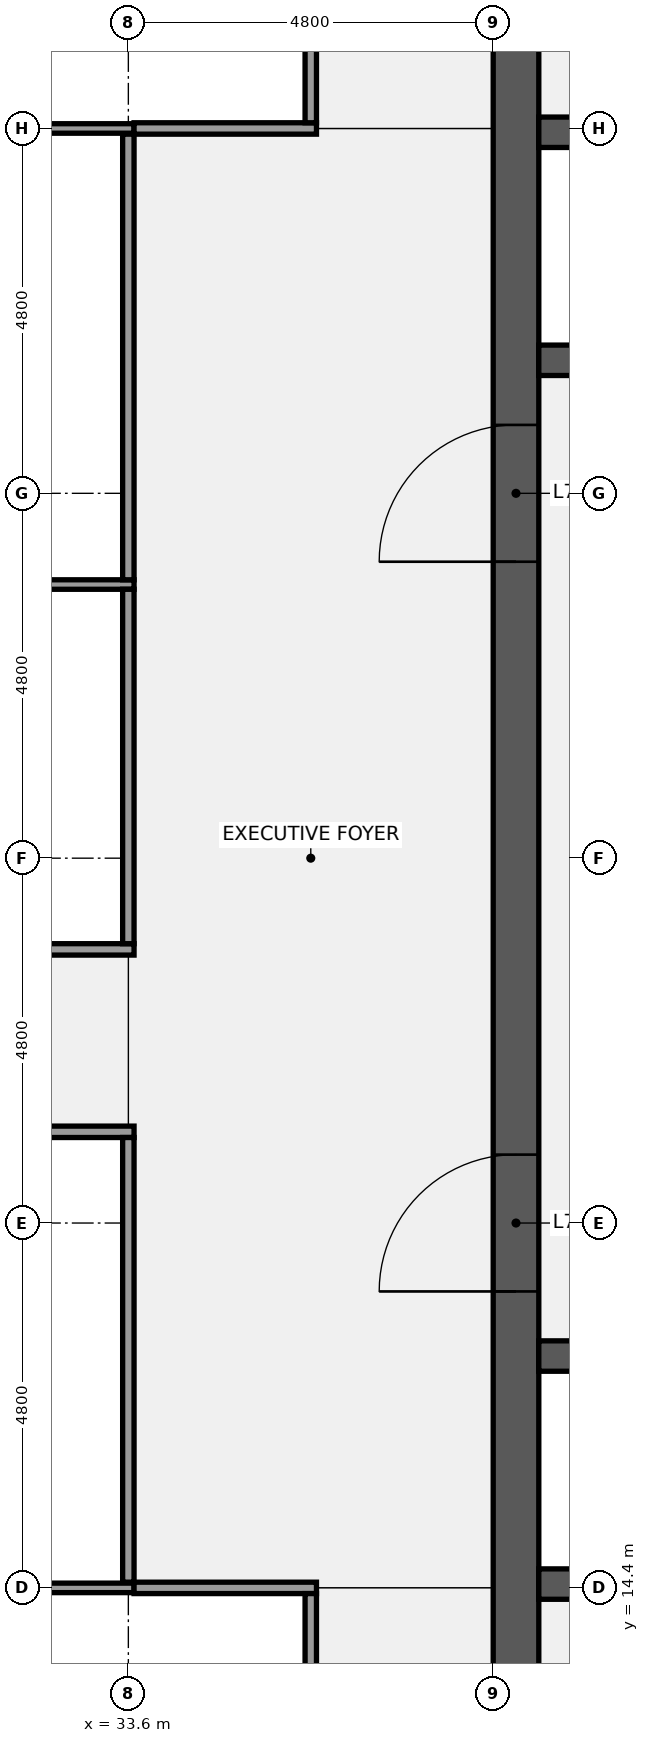
"""IFC4 building model, lengths in metres.
Left out: names, types, materials, properties, quantities, classifications, styles, units other than length and angle.
Written with IfcOpenShell. Run it as: python <this file> out.ifc"""

import sys

from ifc_helpers import new_model, si_unit, direction, frame, frame_2d, origin, place, context, subcontext, project, spatial, rectangle, extrude, element, fill, save


model = new_model("IFC4")
c1 = context("Model", 3, precision=1e-05, world=origin(), true_north=direction((0.0, 1.0)))
c2 = subcontext(c1, "Body", "Model", "MODEL_VIEW")
j1 = project(units=[si_unit("LENGTHUNIT", "METRE"), si_unit("PLANEANGLEUNIT", "RADIAN")], contexts=[c1])
p1 = place(None, origin())
s1 = spatial("IfcSite", under=j1, at=p1, CompositionType="ELEMENT")
p2 = place(p1, origin())
s2 = spatial("IfcBuilding", under=s1, at=p2, CompositionType="ELEMENT")
p3 = place(p2, frame((0.0, 0.0, 318.3)))
s3 = spatial("IfcBuildingStorey", under=s2, at=p3, CompositionType="ELEMENT", Elevation=318.3)
p4 = place(p3, frame((38.7, 9.6, 0.0), z_axis=(0.0, 0.0, 1.0), x_axis=(0.0, 1.0, 0.0)))
e1 = element("IfcWall", 1, at=p4, inside=s3, PredefinedType="SHEAR", context=c2, shape_type="SweptSolid", body=[
    extrude(rectangle(XDim=28.8, YDim=0.6, at=frame_2d((14.4, 0.0))), origin(), (0.0, 0.0, 1.0), 3.84),
])
p5 = place(p4, frame((8.7, 0.0, 0.0)))
e2 = element("IfcOpeningElement", 2, at=p5, cuts=e1, PredefinedType="OPENING", context=c2, shape_type="SweptSolid", body=[
    extrude(rectangle(XDim=1.8, YDim=2.1, at=frame_2d((0.9, 1.05))), frame((0.0, 0.31, 0.0), z_axis=(0.0, -1.0, 0.0), x_axis=(1.0, 0.0, 0.0)), (0.0, 0.0, 1.0), 0.62),
])
p6 = place(p4, frame((18.3, 0.0, 0.0)))
e3 = element("IfcOpeningElement", 3, at=p6, cuts=e1, PredefinedType="OPENING", context=c2, shape_type="SweptSolid", body=[
    extrude(rectangle(XDim=1.8, YDim=2.1, at=frame_2d((0.9, 1.05))), frame((0.0, 0.31, 0.0), z_axis=(0.0, -1.0, 0.0), x_axis=(1.0, 0.0, 0.0)), (0.0, 0.0, 1.0), 0.62),
])
p7 = place(p3, frame((39.0, 14.45, 0.0), z_axis=(0.0, 0.0, 1.0), x_axis=(1.0, 0.0, 0.0)))
e4 = element("IfcWall", 4, at=p7, inside=s3, PredefinedType="SHEAR", context=c2, shape_type="SweptSolid", body=[
    extrude(rectangle(XDim=18.0, YDim=0.4, at=frame_2d((9.0, 0.0))), origin(), (0.0, 0.0, 1.0), 3.84),
])
p8 = place(p3, frame((39.0, 17.45, 0.0), z_axis=(0.0, 0.0, 1.0), x_axis=(1.0, 0.0, 0.0)))
e5 = element("IfcWall", 5, at=p8, inside=s3, PredefinedType="SHEAR", context=c2, shape_type="SweptSolid", body=[
    extrude(rectangle(XDim=18.0, YDim=0.4, at=frame_2d((9.0, 0.0))), origin(), (0.0, 0.0, 1.0), 3.84),
])
p9 = place(p8, frame((14.837, 0.0, 0.0)))
e6 = element("IfcOpeningElement", 6, at=p9, cuts=e5, PredefinedType="OPENING", context=c2, shape_type="SweptSolid", body=[
    extrude(rectangle(XDim=1.0, YDim=2.1, at=frame_2d((0.5, 1.05))), frame((0.0, 0.21, 0.0), z_axis=(0.0, -1.0, 0.0), x_axis=(1.0, 0.0, 0.0)), (0.0, 0.0, 1.0), 0.42),
])
p10 = place(p8, frame((10.9, 0.0, 0.0)))
e7 = element("IfcOpeningElement", 7, at=p10, cuts=e5, PredefinedType="OPENING", context=c2, shape_type="SweptSolid", body=[
    extrude(rectangle(XDim=1.0, YDim=2.1, at=frame_2d((0.5, 1.05))), frame((0.0, 0.21, 0.0), z_axis=(0.0, -1.0, 0.0), x_axis=(1.0, 0.0, 0.0)), (0.0, 0.0, 1.0), 0.42),
])
p11 = place(p8, frame((8.5, 0.0, 0.0)))
e8 = element("IfcOpeningElement", 8, at=p11, cuts=e5, PredefinedType="OPENING", context=c2, shape_type="SweptSolid", body=[
    extrude(rectangle(XDim=1.0, YDim=2.1, at=frame_2d((0.5, 1.05))), frame((0.0, 0.21, 0.0), z_axis=(0.0, -1.0, 0.0), x_axis=(1.0, 0.0, 0.0)), (0.0, 0.0, 1.0), 0.42),
])
p12 = place(p8, frame((3.363, 0.0, 0.0)))
e9 = element("IfcOpeningElement", 9, at=p12, cuts=e5, PredefinedType="OPENING", context=c2, shape_type="SweptSolid", body=[
    extrude(rectangle(XDim=1.0, YDim=2.1, at=frame_2d((0.5, 1.05))), frame((0.0, 0.21, 0.0), z_axis=(0.0, -1.0, 0.0), x_axis=(1.0, 0.0, 0.0)), (0.0, 0.0, 1.0), 0.42),
])
p13 = place(p3, frame((39.0, 30.55, 0.0), z_axis=(0.0, 0.0, 1.0), x_axis=(1.0, 0.0, 0.0)))
e10 = element("IfcWall", 10, at=p13, inside=s3, PredefinedType="SHEAR", context=c2, shape_type="SweptSolid", body=[
    extrude(rectangle(XDim=18.0, YDim=0.4, at=frame_2d((9.0, 0.0))), origin(), (0.0, 0.0, 1.0), 3.84),
])
p14 = place(p13, frame((15.2, 0.0, 0.0)))
e11 = element("IfcOpeningElement", 11, at=p14, cuts=e10, PredefinedType="OPENING", context=c2, shape_type="SweptSolid", body=[
    extrude(rectangle(XDim=1.2, YDim=2.1, at=frame_2d((0.6, 1.05))), frame((0.0, 0.21, 0.0), z_axis=(0.0, -1.0, 0.0), x_axis=(1.0, 0.0, 0.0)), (0.0, 0.0, 1.0), 0.42),
])
p15 = place(p13, frame((12.6, 0.0, 0.0)))
e12 = element("IfcOpeningElement", 12, at=p15, cuts=e10, PredefinedType="OPENING", context=c2, shape_type="SweptSolid", body=[
    extrude(rectangle(XDim=1.2, YDim=2.1, at=frame_2d((0.6, 1.05))), frame((0.0, 0.21, 0.0), z_axis=(0.0, -1.0, 0.0), x_axis=(1.0, 0.0, 0.0)), (0.0, 0.0, 1.0), 0.42),
])
p16 = place(p13, frame((10.0, 0.0, 0.0)))
e13 = element("IfcOpeningElement", 13, at=p16, cuts=e10, PredefinedType="OPENING", context=c2, shape_type="SweptSolid", body=[
    extrude(rectangle(XDim=1.2, YDim=2.1, at=frame_2d((0.6, 1.05))), frame((0.0, 0.21, 0.0), z_axis=(0.0, -1.0, 0.0), x_axis=(1.0, 0.0, 0.0)), (0.0, 0.0, 1.0), 0.42),
])
p17 = place(p13, frame((6.8, 0.0, 0.0)))
e14 = element("IfcOpeningElement", 14, at=p17, cuts=e10, PredefinedType="OPENING", context=c2, shape_type="SweptSolid", body=[
    extrude(rectangle(XDim=1.2, YDim=2.1, at=frame_2d((0.6, 1.05))), frame((0.0, 0.21, 0.0), z_axis=(0.0, -1.0, 0.0), x_axis=(1.0, 0.0, 0.0)), (0.0, 0.0, 1.0), 0.42),
])
p18 = place(p13, frame((4.2, 0.0, 0.0)))
e15 = element("IfcOpeningElement", 15, at=p18, cuts=e10, PredefinedType="OPENING", context=c2, shape_type="SweptSolid", body=[
    extrude(rectangle(XDim=1.2, YDim=2.1, at=frame_2d((0.6, 1.05))), frame((0.0, 0.21, 0.0), z_axis=(0.0, -1.0, 0.0), x_axis=(1.0, 0.0, 0.0)), (0.0, 0.0, 1.0), 0.42),
])
p19 = place(p13, frame((1.6, 0.0, 0.0)))
e16 = element("IfcOpeningElement", 16, at=p19, cuts=e10, PredefinedType="OPENING", context=c2, shape_type="SweptSolid", body=[
    extrude(rectangle(XDim=1.2, YDim=2.1, at=frame_2d((0.6, 1.05))), frame((0.0, 0.21, 0.0), z_axis=(0.0, -1.0, 0.0), x_axis=(1.0, 0.0, 0.0)), (0.0, 0.0, 1.0), 0.42),
])
p20 = place(p3, frame((39.0, 33.55, 0.0), z_axis=(0.0, 0.0, 1.0), x_axis=(1.0, 0.0, 0.0)))
e17 = element("IfcWall", 17, at=p20, inside=s3, PredefinedType="SHEAR", context=c2, shape_type="SweptSolid", body=[
    extrude(rectangle(XDim=18.0, YDim=0.4, at=frame_2d((9.0, 0.0))), origin(), (0.0, 0.0, 1.0), 3.84),
])
p21 = place(p3, frame((24.075, 14.4, 0.0), z_axis=(0.0, 0.0, 1.0), x_axis=(1.0, 0.0, 0.0)))
e18 = element("IfcWall", 18, at=p21, inside=s3, PredefinedType="PARTITIONING", context=c2, shape_type="SweptSolid", body=[
    extrude(rectangle(XDim=9.6, YDim=0.125, at=frame_2d((4.8, 0.0))), origin(), (0.0, 0.0, 1.0), 2.87),
])
p22 = place(p3, frame((33.675, 14.4, 0.0), z_axis=(0.0, 0.0, 1.0), x_axis=(1.0, 0.0, 0.0)))
e19 = element("IfcWall", 19, at=p22, inside=s3, PredefinedType="PARTITIONING", context=c2, shape_type="SweptSolid", body=[
    extrude(rectangle(XDim=2.4, YDim=0.15, at=frame_2d((1.2, 0.0))), origin(), (0.0, 0.0, 1.0), 2.87),
])
p23 = place(p3, frame((23.925, 20.4, 0.0), z_axis=(0.0, 0.0, 1.0), x_axis=(1.0, 0.0, 0.0)))
e20 = element("IfcWall", 20, at=p23, inside=s3, PredefinedType="PARTITIONING", context=c2, shape_type="SweptSolid", body=[
    extrude(rectangle(XDim=9.75, YDim=0.15, at=frame_2d((4.875, 0.0))), origin(), (0.0, 0.0, 1.0), 2.87),
])
p24 = place(p23, frame((4.375, 0.0, 0.0)))
e21 = element("IfcOpeningElement", 21, at=p24, cuts=e20, PredefinedType="OPENING", context=c2, shape_type="SweptSolid", body=[
    extrude(rectangle(XDim=1.0, YDim=2.1, at=frame_2d((0.5, 1.05))), frame((0.0, 0.085, 0.0), z_axis=(0.0, -1.0, 0.0), x_axis=(1.0, 0.0, 0.0)), (0.0, 0.0, 1.0), 0.17),
])
p25 = place(p3, frame((23.925, 22.8, 0.0), z_axis=(0.0, 0.0, 1.0), x_axis=(1.0, 0.0, 0.0)))
e22 = element("IfcWall", 22, at=p25, inside=s3, PredefinedType="PARTITIONING", context=c2, shape_type="SweptSolid", body=[
    extrude(rectangle(XDim=9.75, YDim=0.15, at=frame_2d((4.875, 0.0))), origin(), (0.0, 0.0, 1.0), 2.87),
])
p26 = place(p25, frame((4.375, 0.0, 0.0)))
e23 = element("IfcOpeningElement", 23, at=p26, cuts=e22, PredefinedType="OPENING", context=c2, shape_type="SweptSolid", body=[
    extrude(rectangle(XDim=1.0, YDim=2.1, at=frame_2d((0.5, 1.05))), frame((0.0, 0.085, 0.0), z_axis=(0.0, -1.0, 0.0), x_axis=(1.0, 0.0, 0.0)), (0.0, 0.0, 1.0), 0.17),
])
p27 = place(p3, frame((23.925, 27.6, 0.0), z_axis=(0.0, 0.0, 1.0), x_axis=(1.0, 0.0, 0.0)))
e24 = element("IfcWall", 24, at=p27, inside=s3, PredefinedType="PARTITIONING", context=c2, shape_type="SweptSolid", body=[
    extrude(rectangle(XDim=9.75, YDim=0.125, at=frame_2d((4.875, 0.0))), origin(), (0.0, 0.0, 1.0), 2.87),
])
p28 = place(p3, frame((24.075, 33.6, 0.0), z_axis=(0.0, 0.0, 1.0), x_axis=(1.0, 0.0, 0.0)))
e25 = element("IfcWall", 25, at=p28, inside=s3, PredefinedType="PARTITIONING", context=c2, shape_type="SweptSolid", body=[
    extrude(rectangle(XDim=9.6, YDim=0.125, at=frame_2d((4.8, 0.0))), origin(), (0.0, 0.0, 1.0), 2.87),
])
p29 = place(p3, frame((33.675, 33.6, 0.0), z_axis=(0.0, 0.0, 1.0), x_axis=(1.0, 0.0, 0.0)))
e26 = element("IfcWall", 26, at=p29, inside=s3, PredefinedType="PARTITIONING", context=c2, shape_type="SweptSolid", body=[
    extrude(rectangle(XDim=2.4, YDim=0.15, at=frame_2d((1.2, 0.0))), origin(), (0.0, 0.0, 1.0), 2.87),
])
p30 = place(p3, frame((33.6, 14.475, 0.0), z_axis=(0.0, 0.0, 1.0), x_axis=(0.0, 1.0, 0.0)))
e27 = element("IfcWall", 27, at=p30, inside=s3, PredefinedType="PARTITIONING", context=c2, shape_type="SweptSolid", body=[
    extrude(rectangle(XDim=5.85, YDim=0.15, at=frame_2d((2.925, 0.0))), origin(), (0.0, 0.0, 1.0), 2.87),
])
p31 = place(p3, frame((33.6, 22.875, 0.0), z_axis=(0.0, 0.0, 1.0), x_axis=(0.0, 1.0, 0.0)))
e28 = element("IfcWall", 28, at=p31, inside=s3, PredefinedType="PARTITIONING", context=c2, shape_type="SweptSolid", body=[
    extrude(rectangle(XDim=4.663, YDim=0.15, at=frame_2d((2.331, 0.0))), origin(), (0.0, 0.0, 1.0), 2.87),
])
p32 = place(p3, frame((33.6, 27.663, 0.0), z_axis=(0.0, 0.0, 1.0), x_axis=(0.0, 1.0, 0.0)))
e29 = element("IfcWall", 29, at=p32, inside=s3, PredefinedType="PARTITIONING", context=c2, shape_type="SweptSolid", body=[
    extrude(rectangle(XDim=5.862, YDim=0.15, at=frame_2d((2.931, 0.0))), origin(), (0.0, 0.0, 1.0), 2.87),
])
for number, where, z_axis, x_axis in (
    (30, (36.0, 9.675, 0.0), (0.0, 0.0, 1.0), (0.0, 1.0, 0.0)),
    (31, (36.0, 33.675, 0.0), (0.0, 0.0, 1.0), (0.0, 1.0, 0.0)),
):
    element("IfcWall", number, at=place(p3, frame(where, z_axis=z_axis, x_axis=x_axis)), inside=s3, PredefinedType="PARTITIONING", context=c2, shape_type="SweptSolid", body=[
        extrude(rectangle(XDim=4.65, YDim=0.15, at=frame_2d((2.325, 0.0))), origin(), (0.0, 0.0, 1.0), 2.87),
    ])
p33 = place(p5, origin())
e32 = element("IfcDoor", 32, at=p33, inside=s3, OperationType="DOUBLE_DOOR_SINGLE_SWING", PredefinedType="DOOR", context=c2, shape_type="SweptSolid", body=[
    extrude(rectangle(XDim=1.8, YDim=2.1, at=frame_2d((0.9, 1.05))), frame((0.0, 0.025, 0.0), z_axis=(0.0, -1.0, 0.0), x_axis=(1.0, 0.0, 0.0)), (0.0, 0.0, 1.0), 0.05),
])
fill(e2, e32)
p34 = place(p6, origin())
e33 = element("IfcDoor", 33, at=p34, inside=s3, OperationType="DOUBLE_DOOR_SINGLE_SWING", PredefinedType="DOOR", context=c2, shape_type="SweptSolid", body=[
    extrude(rectangle(XDim=1.8, YDim=2.1, at=frame_2d((0.9, 1.05))), frame((0.0, 0.025, 0.0), z_axis=(0.0, -1.0, 0.0), x_axis=(1.0, 0.0, 0.0)), (0.0, 0.0, 1.0), 0.05),
])
fill(e3, e33)
save(model, sys.argv[1])
